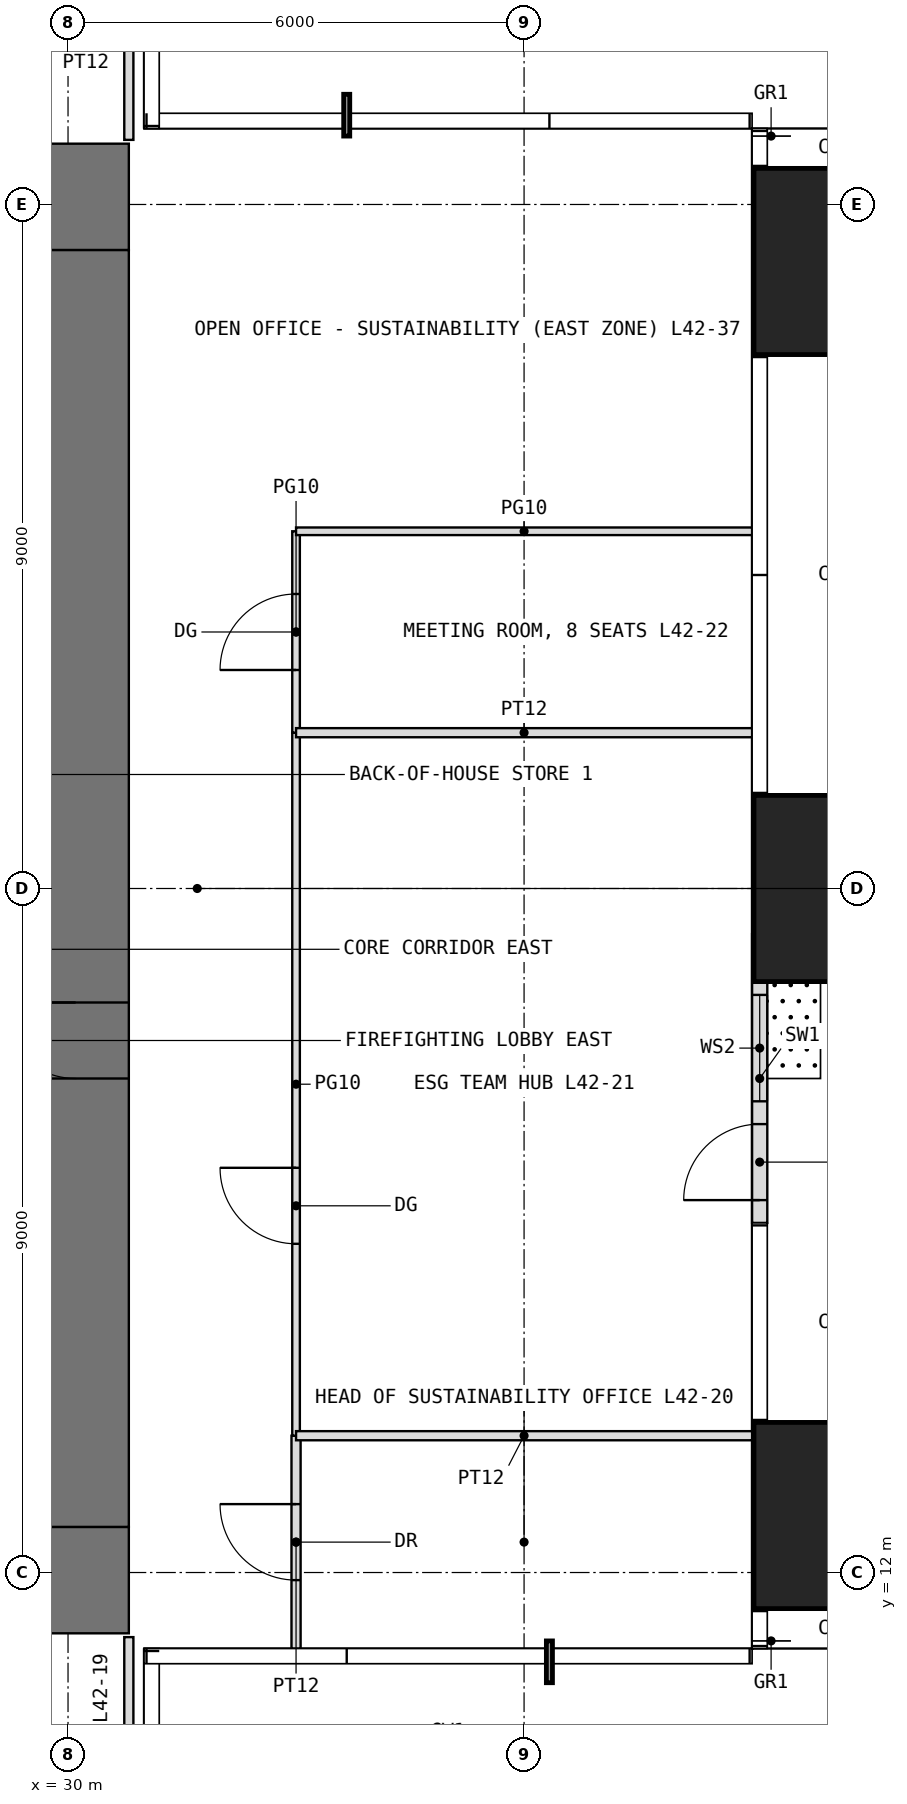
"""IFC4 building model, lengths in metres.
Left out: names, types, materials, properties, quantities, classifications, styles, units other than length and angle.
Written with IfcOpenShell. Run it as: python <this file> out.ifc"""

import sys

from ifc_helpers import new_model, si_unit, direction, frame, frame_2d, origin, origin_2d, place, context, subcontext, project, spatial, rectangle, extrude, element, fill, save


model = new_model("IFC4")
c1 = context("Model", 3, precision=1e-05, world=origin(), true_north=direction((0.0, 1.0)))
c2 = subcontext(c1, "Body", "Model", "MODEL_VIEW")
j1 = project(units=[si_unit("LENGTHUNIT", "METRE"), si_unit("PLANEANGLEUNIT", "RADIAN")], contexts=[c1])
p1 = place(None, origin())
s1 = spatial("IfcSite", under=j1, at=p1, CompositionType="ELEMENT")
p2 = place(p1, origin())
s2 = spatial("IfcBuilding", under=s1, at=p2, CompositionType="ELEMENT")
p3 = place(p2, frame((0.0, 0.0, 178.5)))
s3 = spatial("IfcBuildingStorey", under=s2, at=p3, CompositionType="ELEMENT", Elevation=178.5)
for number, where, z_axis, x_axis in (
    (1, (40.25, 12.75, 0.0), (0.0, 0.0, 1.0), (1.0, 0.0, 0.0)),
    (2, (40.25, 21.0, 0.0), (0.0, 0.0, 1.0), (1.0, 0.0, 0.0)),
    (3, (40.25, 29.25, 0.0), (0.0, 0.0, 1.0), (1.0, 0.0, 0.0)),
):
    element("IfcColumn", number, at=place(p3, frame(where, z_axis=z_axis, x_axis=x_axis)), inside=s3, PredefinedType="COLUMN", context=c2, shape_type="SweptSolid", body=[
        extrude(rectangle(XDim=2.45, YDim=2.45, at=origin_2d()), origin(), (0.0, 0.0, 1.0), 4.0),
    ])
p4 = place(p3, frame((39.1, 16.6, 0.0), z_axis=(0.0, 0.0, 1.0), x_axis=(0.0, 1.0, 0.0)))
e4 = element("IfcWall", 4, at=p4, inside=s3, PredefinedType="USERDEFINED", context=c2, shape_type="SweptSolid", body=[
    extrude(rectangle(XDim=3.8, YDim=0.2, at=frame_2d((1.9, 0.0))), origin(), (0.0, 0.0, 1.0), 3.75),
])
p5 = place(p4, frame((0.3, 0.0, 0.0)))
e5 = element("IfcOpeningElement", 5, at=p5, cuts=e4, PredefinedType="OPENING", context=c2, shape_type="SweptSolid", body=[
    extrude(rectangle(XDim=1.0, YDim=2.4, at=frame_2d((0.5, 1.2))), frame((0.0, 0.11, 0.0), z_axis=(0.0, -1.0, 0.0), x_axis=(1.0, 0.0, 0.0)), (0.0, 0.0, 1.0), 0.22),
])
p6 = place(p4, frame((1.6, 0.0, 0.3)))
e6 = element("IfcOpeningElement", 6, at=p6, cuts=e4, PredefinedType="OPENING", context=c2, shape_type="SweptSolid", body=[
    extrude(rectangle(XDim=1.4, YDim=2.7, at=frame_2d((0.7, 1.35))), frame((0.0, 0.11, 0.0), z_axis=(0.0, -1.0, 0.0), x_axis=(1.0, 0.0, 0.0)), (0.0, 0.0, 1.0), 0.22),
])
p7 = place(p3, frame((11.2, 11.9, -0.05), z_axis=(0.0, 0.0, 1.0), x_axis=(1.0, 0.0, 0.0)))
e7 = element("IfcWall", 7, at=p7, inside=s3, PredefinedType="SHEAR", context=c2, shape_type="SweptSolid", body=[
    extrude(rectangle(XDim=19.6, YDim=1.4, at=frame_2d((9.8, 0.0))), origin(), (0.0, 0.0, 1.0), 4.0),
])
p8 = place(p7, frame((8.8, 0.0, 0.05)))
e8 = element("IfcOpeningElement", 8, at=p8, cuts=e7, PredefinedType="OPENING", context=c2, shape_type="SweptSolid", body=[
    extrude(rectangle(XDim=2.0, YDim=2.2, at=frame_2d((1.0, 1.1))), frame((0.0, 0.71, 0.0), z_axis=(0.0, -1.0, 0.0), x_axis=(1.0, 0.0, 0.0)), (0.0, 0.0, 1.0), 1.42),
])
p9 = place(p3, frame((11.2, 30.1, -0.05), z_axis=(0.0, 0.0, 1.0), x_axis=(1.0, 0.0, 0.0)))
e9 = element("IfcWall", 9, at=p9, inside=s3, PredefinedType="SHEAR", context=c2, shape_type="SweptSolid", body=[
    extrude(rectangle(XDim=19.6, YDim=1.4, at=frame_2d((9.8, 0.0))), origin(), (0.0, 0.0, 1.0), 4.0),
])
p10 = place(p9, frame((8.8, 0.0, 0.05)))
e10 = element("IfcOpeningElement", 10, at=p10, cuts=e9, PredefinedType="OPENING", context=c2, shape_type="SweptSolid", body=[
    extrude(rectangle(XDim=2.0, YDim=2.2, at=frame_2d((1.0, 1.1))), frame((0.0, 0.71, 0.0), z_axis=(0.0, -1.0, 0.0), x_axis=(1.0, 0.0, 0.0)), (0.0, 0.0, 1.0), 1.42),
])
p11 = place(p3, frame((30.1, 12.6, -0.05), z_axis=(0.0, 0.0, 1.0), x_axis=(0.0, 1.0, 0.0)))
e11 = element("IfcWall", 11, at=p11, inside=s3, PredefinedType="SHEAR", context=c2, shape_type="SweptSolid", body=[
    extrude(rectangle(XDim=16.8, YDim=1.4, at=frame_2d((8.4, 0.0))), origin(), (0.0, 0.0, 1.0), 4.0),
])
p12 = place(p11, frame((5.9, 0.0, 0.05)))
e12 = element("IfcOpeningElement", 12, at=p12, cuts=e11, PredefinedType="OPENING", context=c2, shape_type="SweptSolid", body=[
    extrude(rectangle(XDim=1.0, YDim=2.2, at=frame_2d((0.5, 1.1))), frame((0.0, 0.71, 0.0), z_axis=(0.0, -1.0, 0.0), x_axis=(1.0, 0.0, 0.0)), (0.0, 0.0, 1.0), 1.42),
])
p13 = place(p3, frame((30.8, 6.7, 0.0), z_axis=(0.0, 0.0, 1.0), x_axis=(0.0, 1.0, 0.0)))
e13 = element("IfcWall", 13, at=p13, inside=s3, PredefinedType="PARTITIONING", context=c2, shape_type="SweptSolid", body=[
    extrude(rectangle(XDim=4.45, YDim=0.12, at=frame_2d((2.225, 0.0))), origin(), (0.0, 0.0, 1.0), 3.75),
])
p14 = place(p3, frame((30.8, 30.85, 0.0), z_axis=(0.0, 0.0, 1.0), x_axis=(0.0, 1.0, 0.0)))
e14 = element("IfcWall", 14, at=p14, inside=s3, PredefinedType="PARTITIONING", context=c2, shape_type="SweptSolid", body=[
    extrude(rectangle(XDim=3.15, YDim=0.12, at=frame_2d((1.575, 0.0))), origin(), (0.0, 0.0, 1.0), 3.75),
])
p15 = place(p3, frame((33.0, 11.0, 0.0), z_axis=(0.0, 0.0, 1.0), x_axis=(0.0, 1.0, 0.0)))
e15 = element("IfcWall", 15, at=p15, inside=s3, PredefinedType="PARTITIONING", context=c2, shape_type="SweptSolid", body=[
    extrude(rectangle(XDim=2.8, YDim=0.12, at=frame_2d((1.4, 0.0))), origin(), (0.0, 0.0, 1.0), 3.75),
])
p16 = place(p15, frame((0.9, 0.0, 0.0)))
e16 = element("IfcOpeningElement", 16, at=p16, cuts=e15, PredefinedType="OPENING", context=c2, shape_type="SweptSolid", body=[
    extrude(rectangle(XDim=1.0, YDim=2.2, at=frame_2d((0.5, 1.1))), frame((0.0, 0.07, 0.0), z_axis=(0.0, -1.0, 0.0), x_axis=(1.0, 0.0, 0.0)), (0.0, 0.0, 1.0), 0.14),
])
p17 = place(p3, frame((33.0, 13.8, 0.0), z_axis=(0.0, 0.0, 1.0), x_axis=(0.0, 1.0, 0.0)))
e17 = element("IfcWall", 17, at=p17, inside=s3, PredefinedType="PARTITIONING", context=c2, shape_type="SweptSolid", body=[
    extrude(rectangle(XDim=9.25, YDim=0.1, at=frame_2d((4.625, 0.0))), origin(), (0.0, 0.0, 1.0), 3.75),
])
p18 = place(p17, frame((2.525, 0.0, 0.0)))
e18 = element("IfcOpeningElement", 18, at=p18, cuts=e17, PredefinedType="OPENING", context=c2, shape_type="SweptSolid", body=[
    extrude(rectangle(XDim=1.0, YDim=2.4, at=frame_2d((0.5, 1.2))), frame((0.0, 0.06, 0.0), z_axis=(0.0, -1.0, 0.0), x_axis=(1.0, 0.0, 0.0)), (0.0, 0.0, 1.0), 0.12),
])
p19 = place(p3, frame((33.0, 13.8, 0.0), z_axis=(0.0, 0.0, 1.0), x_axis=(1.0, 0.0, 0.0)))
e19 = element("IfcWall", 19, at=p19, inside=s3, PredefinedType="PARTITIONING", context=c2, shape_type="SweptSolid", body=[
    extrude(rectangle(XDim=6.0, YDim=0.12, at=frame_2d((3.0, 0.0))), origin(), (0.0, 0.0, 1.0), 3.75),
])
p20 = place(p3, frame((33.0, 23.05, 0.0), z_axis=(0.0, 0.0, 1.0), x_axis=(0.0, 1.0, 0.0)))
e20 = element("IfcWall", 20, at=p20, inside=s3, PredefinedType="PARTITIONING", context=c2, shape_type="SweptSolid", body=[
    extrude(rectangle(XDim=2.65, YDim=0.1, at=frame_2d((1.325, 0.0))), origin(), (0.0, 0.0, 1.0), 3.75),
])
p21 = place(p20, frame((0.825, 0.0, 0.0)))
e21 = element("IfcOpeningElement", 21, at=p21, cuts=e20, PredefinedType="OPENING", context=c2, shape_type="SweptSolid", body=[
    extrude(rectangle(XDim=1.0, YDim=2.4, at=frame_2d((0.5, 1.2))), frame((0.0, 0.06, 0.0), z_axis=(0.0, -1.0, 0.0), x_axis=(1.0, 0.0, 0.0)), (0.0, 0.0, 1.0), 0.12),
])
p22 = place(p3, frame((33.0, 23.05, 0.0), z_axis=(0.0, 0.0, 1.0), x_axis=(1.0, 0.0, 0.0)))
e22 = element("IfcWall", 22, at=p22, inside=s3, PredefinedType="PARTITIONING", context=c2, shape_type="SweptSolid", body=[
    extrude(rectangle(XDim=6.0, YDim=0.12, at=frame_2d((3.0, 0.0))), origin(), (0.0, 0.0, 1.0), 3.75),
])
p23 = place(p3, frame((33.0, 25.7, 0.0), z_axis=(0.0, 0.0, 1.0), x_axis=(1.0, 0.0, 0.0)))
e23 = element("IfcWall", 23, at=p23, inside=s3, PredefinedType="PARTITIONING", context=c2, shape_type="SweptSolid", body=[
    extrude(rectangle(XDim=6.0, YDim=0.1, at=frame_2d((3.0, 0.0))), origin(), (0.0, 0.0, 1.0), 3.75),
])
p24 = place(p5, origin())
e24 = element("IfcDoor", 24, at=p24, inside=s3, OperationType="SINGLE_SWING_LEFT", PredefinedType="DOOR", context=c2, shape_type="SweptSolid", body=[
    extrude(rectangle(XDim=1.0, YDim=2.4, at=frame_2d((0.5, 1.2))), frame((0.0, 0.025, 0.0), z_axis=(0.0, -1.0, 0.0), x_axis=(1.0, 0.0, 0.0)), (0.0, 0.0, 1.0), 0.05),
])
fill(e5, e24)
p25 = place(p6, origin())
e25 = element("IfcWindow", 25, at=p25, inside=s3, PartitioningType="SINGLE_PANEL", PredefinedType="WINDOW", context=c2, shape_type="SweptSolid", body=[
    extrude(rectangle(XDim=1.4, YDim=2.7, at=frame_2d((0.7, 1.35))), frame((0.0, 0.03, 0.0), z_axis=(0.0, -1.0, 0.0), x_axis=(1.0, 0.0, 0.0)), (0.0, 0.0, 1.0), 0.06),
])
fill(e6, e25)
p26 = place(p12, origin())
e26 = element("IfcDoor", 26, at=p26, inside=s3, OperationType="SINGLE_SWING_RIGHT", PredefinedType="DOOR", context=c2, shape_type="SweptSolid", body=[
    extrude(rectangle(XDim=1.0, YDim=2.2, at=frame_2d((0.5, 1.1))), frame((0.0, 0.025, 0.0), z_axis=(0.0, -1.0, 0.0), x_axis=(1.0, 0.0, 0.0)), (0.0, 0.0, 1.0), 0.05),
])
fill(e12, e26)
p27 = place(p16, origin())
e27 = element("IfcDoor", 27, at=p27, inside=s3, OperationType="SINGLE_SWING_RIGHT", PredefinedType="DOOR", context=c2, shape_type="SweptSolid", body=[
    extrude(rectangle(XDim=1.0, YDim=2.2, at=frame_2d((0.5, 1.1))), frame((0.0, 0.025, 0.0), z_axis=(0.0, -1.0, 0.0), x_axis=(1.0, 0.0, 0.0)), (0.0, 0.0, 1.0), 0.05),
])
fill(e16, e27)
p28 = place(p18, origin())
e28 = element("IfcDoor", 28, at=p28, inside=s3, OperationType="SINGLE_SWING_RIGHT", PredefinedType="DOOR", context=c2, shape_type="SweptSolid", body=[
    extrude(rectangle(XDim=1.0, YDim=2.4, at=frame_2d((0.5, 1.2))), frame((0.0, 0.025, 0.0), z_axis=(0.0, -1.0, 0.0), x_axis=(1.0, 0.0, 0.0)), (0.0, 0.0, 1.0), 0.05),
])
fill(e18, e28)
p29 = place(p21, origin())
e29 = element("IfcDoor", 29, at=p29, inside=s3, OperationType="SINGLE_SWING_LEFT", PredefinedType="DOOR", context=c2, shape_type="SweptSolid", body=[
    extrude(rectangle(XDim=1.0, YDim=2.4, at=frame_2d((0.5, 1.2))), frame((0.0, 0.025, 0.0), z_axis=(0.0, -1.0, 0.0), x_axis=(1.0, 0.0, 0.0)), (0.0, 0.0, 1.0), 0.05),
])
fill(e21, e29)
save(model, sys.argv[1])
